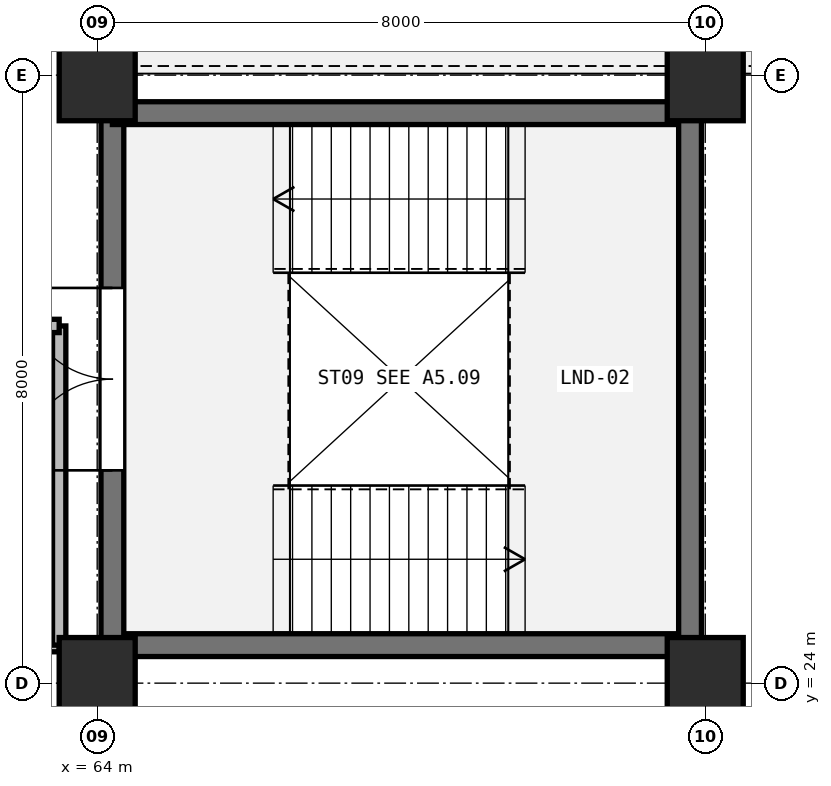
"""IFC4 building model, lengths in metres.
Left out: names, types, materials, properties, quantities, classifications, styles, units other than length and angle.
Written with IfcOpenShell. Run it as: python <this file> out.ifc"""

import sys

from ifc_helpers import new_model, si_unit, direction, frame, frame_2d, origin, origin_2d, place, context, subcontext, project, spatial, rectangle, extrude, element, fill, save


model = new_model("IFC4")
c1 = context("Model", 3, precision=1e-05, world=origin(), true_north=direction((0.0, 1.0)))
c2 = subcontext(c1, "Body", "Model", "MODEL_VIEW")
j1 = project(units=[si_unit("LENGTHUNIT", "METRE"), si_unit("PLANEANGLEUNIT", "RADIAN")], contexts=[c1])
p1 = place(None, origin())
s1 = spatial("IfcSite", under=j1, at=p1, CompositionType="ELEMENT")
p2 = place(p1, origin())
s2 = spatial("IfcBuilding", under=s1, at=p2, CompositionType="ELEMENT")
p3 = place(p2, frame((0.0, 0.0, 15.0)))
s3 = spatial("IfcBuildingStorey", under=s2, at=p3, CompositionType="ELEMENT", Elevation=15.0)
for number, where, z_axis, x_axis in (
    (1, (64.0, 24.0, 0.0), (0.0, 0.0, 1.0), (1.0, 0.0, 0.0)),
    (2, (64.0, 32.0, 0.0), (0.0, 0.0, 1.0), (1.0, 0.0, 0.0)),
    (3, (72.0, 24.0, 0.0), (0.0, 0.0, 1.0), (1.0, 0.0, 0.0)),
    (4, (72.0, 32.0, 0.0), (0.0, 0.0, 1.0), (1.0, 0.0, 0.0)),
):
    element("IfcColumn", number, at=place(p3, frame(where, z_axis=z_axis, x_axis=x_axis)), inside=s3, PredefinedType="COLUMN", context=c2, shape_type="SweptSolid", body=[
        extrude(rectangle(XDim=1.0, YDim=1.2, at=origin_2d()), origin(), (0.0, 0.0, 1.0), 4.8),
    ])
p4 = place(p3, frame((71.8, 24.5, 0.0), z_axis=(0.0, 0.0, 1.0), x_axis=(-1.0, 0.0, 0.0)))
e5 = element("IfcWall", 5, at=p4, inside=s3, PredefinedType="SHEAR", context=c2, shape_type="SweptSolid", body=[
    extrude(rectangle(XDim=7.6, YDim=0.3, at=frame_2d((3.8, 0.0))), origin(), (0.0, 0.0, 1.0), 4.5),
])
p5 = place(p3, frame((64.2, 24.5, 0.0), z_axis=(0.0, 0.0, 1.0), x_axis=(0.0, 1.0, 0.0)))
e6 = element("IfcWall", 6, at=p5, inside=s3, PredefinedType="SHEAR", context=c2, shape_type="SweptSolid", body=[
    extrude(rectangle(XDim=7.0, YDim=0.3, at=frame_2d((3.5, 0.0))), origin(), (0.0, 0.0, 1.0), 4.5),
])
p6 = place(p5, frame((2.3, 0.0, 0.0)))
e7 = element("IfcOpeningElement", 7, at=p6, cuts=e6, PredefinedType="OPENING", context=c2, shape_type="SweptSolid", body=[
    extrude(rectangle(XDim=2.4, YDim=2.2, at=frame_2d((1.2, 1.1))), frame((0.0, 0.16, 0.0), z_axis=(0.0, -1.0, 0.0), x_axis=(1.0, 0.0, 0.0)), (0.0, 0.0, 1.0), 0.32),
])
p7 = place(p3, frame((64.2, 31.5, 0.0), z_axis=(0.0, 0.0, 1.0), x_axis=(1.0, 0.0, 0.0)))
e8 = element("IfcWall", 8, at=p7, inside=s3, PredefinedType="SHEAR", context=c2, shape_type="SweptSolid", body=[
    extrude(rectangle(XDim=7.6, YDim=0.3, at=frame_2d((3.8, 0.0))), origin(), (0.0, 0.0, 1.0), 4.5),
])
p8 = place(p3, frame((71.8, 31.5, 0.0), z_axis=(0.0, 0.0, 1.0), x_axis=(0.0, -1.0, 0.0)))
e9 = element("IfcWall", 9, at=p8, inside=s3, PredefinedType="SHEAR", context=c2, shape_type="SweptSolid", body=[
    extrude(rectangle(XDim=7.0, YDim=0.3, at=frame_2d((3.5, 0.0))), origin(), (0.0, 0.0, 1.0), 4.5),
])
p9 = place(p3, frame((60.3, 24.5, 0.0), z_axis=(0.0, 0.0, 1.0), x_axis=(1.0, 0.0, 0.0)))
e10 = element("IfcWall", 10, at=p9, inside=s3, PredefinedType="PARTITIONING", context=c2, shape_type="SweptSolid", body=[
    extrude(rectangle(XDim=3.2, YDim=0.175, at=frame_2d((1.6, 0.0))), origin(), (0.0, 0.0, 1.0), 4.5),
])
p10 = place(p3, frame((63.5, 24.5, 0.0), z_axis=(0.0, 0.0, 1.0), x_axis=(0.0, 1.0, 0.0)))
e11 = element("IfcWall", 11, at=p10, inside=s3, PredefinedType="PARTITIONING", context=c2, shape_type="SweptSolid", body=[
    extrude(rectangle(XDim=4.2, YDim=0.175, at=frame_2d((2.1, 0.0))), origin(), (0.0, 0.0, 1.0), 3.6),
])
p11 = place(p3, frame((63.5, 28.7, 0.0), z_axis=(0.0, 0.0, 1.0), x_axis=(-1.0, 0.0, 0.0)))
e12 = element("IfcWall", 12, at=p11, inside=s3, PredefinedType="PARTITIONING", context=c2, shape_type="SweptSolid", body=[
    extrude(rectangle(XDim=3.2, YDim=0.175, at=frame_2d((1.6, 0.0))), origin(), (0.0, 0.0, 1.0), 4.5),
])
p12 = place(p11, frame((1.125, 0.0, 0.0)))
e13 = element("IfcOpeningElement", 13, at=p12, cuts=e12, PredefinedType="OPENING", context=c2, shape_type="SweptSolid", body=[
    extrude(rectangle(XDim=0.95, YDim=2.15, at=frame_2d((0.475, 1.075))), frame((0.0, 0.098, 0.0), z_axis=(0.0, -1.0, 0.0), x_axis=(1.0, 0.0, 0.0)), (0.0, 0.0, 1.0), 0.195),
])
p13 = place(p6, frame((2.4, 0.0, 0.0), z_axis=(0.0, 0.0, 1.0), x_axis=(-1.0, 0.0, 0.0)))
e14 = element("IfcDoor", 14, at=p13, inside=s3, OperationType="DOUBLE_DOOR_SINGLE_SWING", PredefinedType="DOOR", context=c2, shape_type="SweptSolid", body=[
    extrude(rectangle(XDim=2.4, YDim=2.2, at=frame_2d((1.2, 1.1))), frame((0.0, 0.025, 0.0), z_axis=(0.0, -1.0, 0.0), x_axis=(1.0, 0.0, 0.0)), (0.0, 0.0, 1.0), 0.05),
])
fill(e7, e14)
save(model, sys.argv[1])
